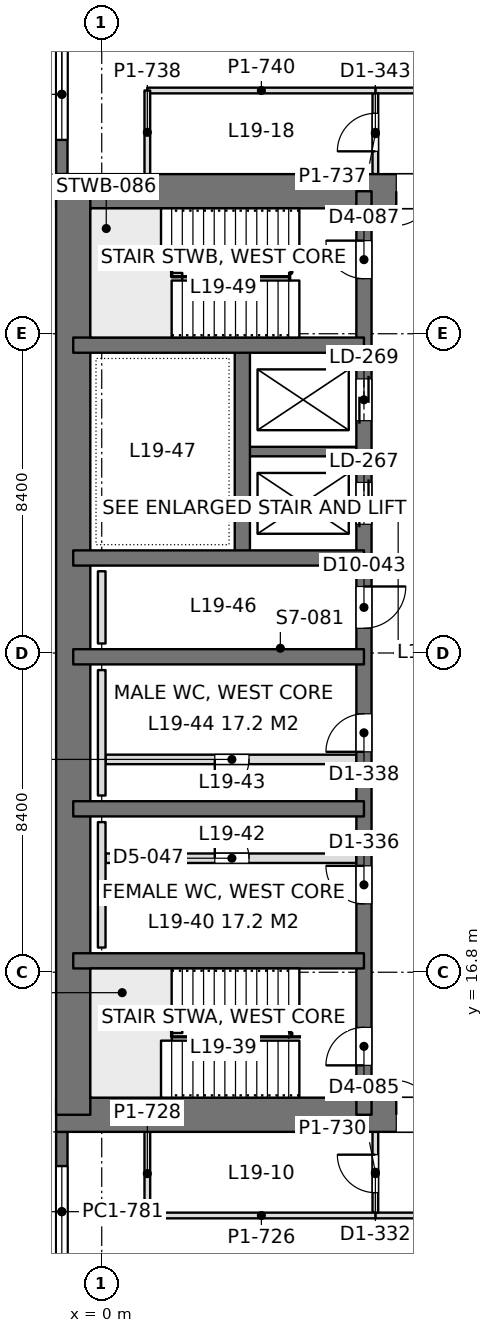
"""IFC4 building model, lengths in metres.
Left out: names, types, materials, properties, quantities, classifications, styles, units other than length and angle.
Written with IfcOpenShell. Run it as: python <this file> out.ifc"""

import sys

from ifc_helpers import new_model, si_unit, direction, frame, frame_2d, origin, place, context, subcontext, project, spatial, rectangle, extrude, element, fill, save


model = new_model("IFC4")
c1 = context("Model", 3, precision=1e-05, world=origin(), true_north=direction((0.0, 1.0)))
c2 = subcontext(c1, "Body", "Model", "MODEL_VIEW")
j1 = project(units=[si_unit("LENGTHUNIT", "METRE"), si_unit("PLANEANGLEUNIT", "RADIAN")], contexts=[c1])
p1 = place(None, origin())
s1 = spatial("IfcSite", under=j1, at=p1, CompositionType="ELEMENT")
p2 = place(p1, origin())
s2 = spatial("IfcBuilding", under=s1, at=p2, CompositionType="ELEMENT")
p3 = place(p2, frame((0.0, 0.0, 86.4)))
s3 = spatial("IfcBuildingStorey", under=s2, at=p3, CompositionType="ELEMENT", Elevation=86.4)
p4 = place(p3, frame((-1.2, 13.05, 0.0), z_axis=(0.0, 0.0, 1.0), x_axis=(1.0, 0.0, 0.0)))
e1 = element("IfcWall", 1, at=p4, inside=s3, PredefinedType="SHEAR", context=c2, shape_type="SweptSolid", body=[
    extrude(rectangle(XDim=18.0, YDim=0.9, at=frame_2d((9.0, 0.0))), origin(), (0.0, 0.0, 1.0), 4.5),
])
p5 = place(p4, frame((8.95, 0.0, 0.0)))
e2 = element("IfcOpeningElement", 2, at=p5, cuts=e1, PredefinedType="OPENING", context=c2, shape_type="SweptSolid", body=[
    extrude(rectangle(XDim=1.8, YDim=2.4, at=frame_2d((0.9, 1.2))), frame((0.0, 0.46, 0.0), z_axis=(0.0, -1.0, 0.0), x_axis=(1.0, 0.0, 0.0)), (0.0, 0.0, 1.0), 0.92),
])
p6 = place(p3, frame((-1.2, 37.35, 0.0), z_axis=(0.0, 0.0, 1.0), x_axis=(1.0, 0.0, 0.0)))
e3 = element("IfcWall", 3, at=p6, inside=s3, PredefinedType="SHEAR", context=c2, shape_type="SweptSolid", body=[
    extrude(rectangle(XDim=18.0, YDim=0.9, at=frame_2d((9.0, 0.0))), origin(), (0.0, 0.0, 1.0), 4.5),
])
p7 = place(p6, frame((8.95, 0.0, 0.0)))
e4 = element("IfcOpeningElement", 4, at=p7, cuts=e3, PredefinedType="OPENING", context=c2, shape_type="SweptSolid", body=[
    extrude(rectangle(XDim=1.8, YDim=2.4, at=frame_2d((0.9, 1.2))), frame((0.0, 0.46, 0.0), z_axis=(0.0, -1.0, 0.0), x_axis=(1.0, 0.0, 0.0)), (0.0, 0.0, 1.0), 0.92),
])
p8 = place(p3, frame((-0.75, 13.05, 0.0), z_axis=(0.0, 0.0, 1.0), x_axis=(0.0, 1.0, 0.0)))
e5 = element("IfcWall", 5, at=p8, inside=s3, PredefinedType="SHEAR", context=c2, shape_type="SweptSolid", body=[
    extrude(rectangle(XDim=24.3, YDim=0.9, at=frame_2d((12.15, 0.0))), origin(), (0.0, 0.0, 1.0), 4.5),
])
p9 = place(p3, frame((6.9, 13.05, 0.0), z_axis=(0.0, 0.0, 1.0), x_axis=(0.0, 1.0, 0.0)))
e6 = element("IfcWall", 6, at=p9, inside=s3, PredefinedType="SHEAR", context=c2, shape_type="SweptSolid", body=[
    extrude(rectangle(XDim=24.3, YDim=0.4, at=frame_2d((12.15, 0.0))), origin(), (0.0, 0.0, 1.0), 4.5),
])
p10 = place(p9, frame((1.3, 0.0, 0.0)))
e7 = element("IfcOpeningElement", 7, at=p10, cuts=e6, PredefinedType="OPENING", context=c2, shape_type="SweptSolid", body=[
    extrude(rectangle(XDim=1.0, YDim=2.2, at=frame_2d((0.5, 1.1))), frame((0.0, 0.21, 0.0), z_axis=(0.0, -1.0, 0.0), x_axis=(1.0, 0.0, 0.0)), (0.0, 0.0, 1.0), 0.42),
])
p11 = place(p9, frame((22.0, 0.0, 0.0)))
e8 = element("IfcOpeningElement", 8, at=p11, cuts=e6, PredefinedType="OPENING", context=c2, shape_type="SweptSolid", body=[
    extrude(rectangle(XDim=1.0, YDim=2.2, at=frame_2d((0.5, 1.1))), frame((0.0, 0.21, 0.0), z_axis=(0.0, -1.0, 0.0), x_axis=(1.0, 0.0, 0.0)), (0.0, 0.0, 1.0), 0.42),
])
p12 = place(p9, frame((5.55, 0.0, 0.0)))
e9 = element("IfcOpeningElement", 9, at=p12, cuts=e6, PredefinedType="OPENING", context=c2, shape_type="SweptSolid", body=[
    extrude(rectangle(XDim=1.0, YDim=2.2, at=frame_2d((0.5, 1.1))), frame((0.0, 0.21, 0.0), z_axis=(0.0, -1.0, 0.0), x_axis=(1.0, 0.0, 0.0)), (0.0, 0.0, 1.0), 0.42),
])
p13 = place(p9, frame((9.55, 0.0, 0.0)))
e10 = element("IfcOpeningElement", 10, at=p13, cuts=e6, PredefinedType="OPENING", context=c2, shape_type="SweptSolid", body=[
    extrude(rectangle(XDim=1.0, YDim=2.2, at=frame_2d((0.5, 1.1))), frame((0.0, 0.21, 0.0), z_axis=(0.0, -1.0, 0.0), x_axis=(1.0, 0.0, 0.0)), (0.0, 0.0, 1.0), 0.42),
])
p14 = place(p9, frame((12.8, 0.0, 0.0)))
e11 = element("IfcOpeningElement", 11, at=p14, cuts=e6, PredefinedType="OPENING", context=c2, shape_type="SweptSolid", body=[
    extrude(rectangle(XDim=1.1, YDim=2.2, at=frame_2d((0.55, 1.1))), frame((0.0, 0.21, 0.0), z_axis=(0.0, -1.0, 0.0), x_axis=(1.0, 0.0, 0.0)), (0.0, 0.0, 1.0), 0.42),
])
p15 = place(p9, frame((15.538, 0.0, 0.0)))
e12 = element("IfcOpeningElement", 12, at=p15, cuts=e6, PredefinedType="OPENING", context=c2, shape_type="SweptSolid", body=[
    extrude(rectangle(XDim=1.1, YDim=2.2, at=frame_2d((0.55, 1.1))), frame((0.0, 0.21, 0.0), z_axis=(0.0, -1.0, 0.0), x_axis=(1.0, 0.0, 0.0)), (0.0, 0.0, 1.0), 0.42),
])
p16 = place(p9, frame((18.262, 0.0, 0.0)))
e13 = element("IfcOpeningElement", 13, at=p16, cuts=e6, PredefinedType="OPENING", context=c2, shape_type="SweptSolid", body=[
    extrude(rectangle(XDim=1.1, YDim=2.2, at=frame_2d((0.55, 1.1))), frame((0.0, 0.21, 0.0), z_axis=(0.0, -1.0, 0.0), x_axis=(1.0, 0.0, 0.0)), (0.0, 0.0, 1.0), 0.42),
])
for number, where, z_axis, x_axis in (
    (14, (-0.75, 17.1, 0.0), (0.0, 0.0, 1.0), (1.0, 0.0, 0.0)),
    (15, (-0.75, 21.1, 0.0), (0.0, 0.0, 1.0), (1.0, 0.0, 0.0)),
    (16, (-0.75, 25.1, 0.0), (0.0, 0.0, 1.0), (1.0, 0.0, 0.0)),
    (17, (-0.75, 27.7, 0.0), (0.0, 0.0, 1.0), (1.0, 0.0, 0.0)),
    (18, (-0.75, 33.3, 0.0), (0.0, 0.0, 1.0), (1.0, 0.0, 0.0)),
):
    element("IfcWall", number, at=place(p3, frame(where, z_axis=z_axis, x_axis=x_axis)), inside=s3, PredefinedType="SHEAR", context=c2, shape_type="SweptSolid", body=[
        extrude(rectangle(XDim=7.65, YDim=0.4, at=frame_2d((3.825, 0.0))), origin(), (0.0, 0.0, 1.0), 4.5),
    ])
p17 = place(p3, frame((3.7, 27.7, 0.0), z_axis=(0.0, 0.0, 1.0), x_axis=(0.0, 1.0, 0.0)))
e19 = element("IfcWall", 19, at=p17, inside=s3, PredefinedType="SHEAR", context=c2, shape_type="SweptSolid", body=[
    extrude(rectangle(XDim=5.6, YDim=0.4, at=frame_2d((2.8, 0.0))), origin(), (0.0, 0.0, 1.0), 4.5),
])
p18 = place(p3, frame((3.7, 30.5, 0.0), z_axis=(0.0, 0.0, 1.0), x_axis=(1.0, 0.0, 0.0)))
e20 = element("IfcWall", 20, at=p18, inside=s3, PredefinedType="SHEAR", context=c2, shape_type="SweptSolid", body=[
    extrude(rectangle(XDim=3.2, YDim=0.25, at=frame_2d((1.6, 0.0))), origin(), (0.0, 0.0, 1.0), 4.5),
])
p19 = place(p3, frame((-1.05, 8.4, 0.0), z_axis=(0.0, 0.0, 1.0), x_axis=(0.0, 1.0, 0.0)))
e21 = element("IfcWall", 21, at=p19, inside=s3, PredefinedType="SOLIDWALL", context=c2, shape_type="SweptSolid", body=[
    extrude(rectangle(XDim=4.2, YDim=0.3, at=frame_2d((2.1, 0.0))), origin(), (0.0, 0.0, 1.0), 4.3),
])
p20 = place(p19, frame((0.9, 0.0, 0.9)))
e22 = element("IfcOpeningElement", 22, at=p20, cuts=e21, PredefinedType="OPENING", context=c2, shape_type="SweptSolid", body=[
    extrude(rectangle(XDim=2.4, YDim=1.9, at=frame_2d((1.2, 0.95))), frame((0.0, 0.16, 0.0), z_axis=(0.0, -1.0, 0.0), x_axis=(1.0, 0.0, 0.0)), (0.0, 0.0, 1.0), 0.32),
])
p21 = place(p3, frame((-1.05, 37.8, 0.0), z_axis=(0.0, 0.0, 1.0), x_axis=(0.0, 1.0, 0.0)))
e23 = element("IfcWall", 23, at=p21, inside=s3, PredefinedType="SOLIDWALL", context=c2, shape_type="SweptSolid", body=[
    extrude(rectangle(XDim=4.2, YDim=0.3, at=frame_2d((2.1, 0.0))), origin(), (0.0, 0.0, 1.0), 4.3),
])
p22 = place(p21, frame((0.9, 0.0, 0.9)))
e24 = element("IfcOpeningElement", 24, at=p22, cuts=e23, PredefinedType="OPENING", context=c2, shape_type="SweptSolid", body=[
    extrude(rectangle(XDim=2.4, YDim=1.9, at=frame_2d((1.2, 0.95))), frame((0.0, 0.16, 0.0), z_axis=(0.0, -1.0, 0.0), x_axis=(1.0, 0.0, 0.0)), (0.0, 0.0, 1.0), 0.32),
])
p23 = place(p3, frame((7.198, 10.4, 0.0), z_axis=(0.0, 0.0, 1.0), x_axis=(1.0, 0.0, 0.0)))
e25 = element("IfcWall", 25, at=p23, inside=s3, PredefinedType="PARTITIONING", context=c2, shape_type="SweptSolid", body=[
    extrude(rectangle(XDim=42.002, YDim=0.15, at=frame_2d((21.001, 0.0))), origin(), (0.0, 0.0, 1.0), 3.6),
])
p24 = place(p23, frame((4.502, 0.0, 0.0)))
e26 = element("IfcOpeningElement", 26, at=p24, cuts=e25, PredefinedType="OPENING", context=c2, shape_type="SweptSolid", body=[
    extrude(rectangle(XDim=1.8, YDim=2.2, at=frame_2d((0.9, 1.1))), frame((0.0, 0.085, 0.0), z_axis=(0.0, -1.0, 0.0), x_axis=(1.0, 0.0, 0.0)), (0.0, 0.0, 1.0), 0.17),
])
p25 = place(p23, frame((12.902, 0.0, 0.0)))
e27 = element("IfcOpeningElement", 27, at=p25, cuts=e25, PredefinedType="OPENING", context=c2, shape_type="SweptSolid", body=[
    extrude(rectangle(XDim=1.8, YDim=2.2, at=frame_2d((0.9, 1.1))), frame((0.0, 0.085, 0.0), z_axis=(0.0, -1.0, 0.0), x_axis=(1.0, 0.0, 0.0)), (0.0, 0.0, 1.0), 0.17),
])
p26 = place(p23, frame((21.302, 0.0, 0.0)))
e28 = element("IfcOpeningElement", 28, at=p26, cuts=e25, PredefinedType="OPENING", context=c2, shape_type="SweptSolid", body=[
    extrude(rectangle(XDim=1.8, YDim=2.2, at=frame_2d((0.9, 1.1))), frame((0.0, 0.085, 0.0), z_axis=(0.0, -1.0, 0.0), x_axis=(1.0, 0.0, 0.0)), (0.0, 0.0, 1.0), 0.17),
])
p27 = place(p23, frame((29.702, 0.0, 0.0)))
e29 = element("IfcOpeningElement", 29, at=p27, cuts=e25, PredefinedType="OPENING", context=c2, shape_type="SweptSolid", body=[
    extrude(rectangle(XDim=1.8, YDim=2.2, at=frame_2d((0.9, 1.1))), frame((0.0, 0.085, 0.0), z_axis=(0.0, -1.0, 0.0), x_axis=(1.0, 0.0, 0.0)), (0.0, 0.0, 1.0), 0.17),
])
p28 = place(p23, frame((38.102, 0.0, 0.0)))
e30 = element("IfcOpeningElement", 30, at=p28, cuts=e25, PredefinedType="OPENING", context=c2, shape_type="SweptSolid", body=[
    extrude(rectangle(XDim=1.8, YDim=2.2, at=frame_2d((0.9, 1.1))), frame((0.0, 0.085, 0.0), z_axis=(0.0, -1.0, 0.0), x_axis=(1.0, 0.0, 0.0)), (0.0, 0.0, 1.0), 0.17),
])
p29 = place(p3, frame((7.2, 10.474, 0.0), z_axis=(0.0, 0.0, 1.0), x_axis=(0.0, 1.0, 0.0)))
e31 = element("IfcWall", 31, at=p29, inside=s3, PredefinedType="PARTITIONING", context=c2, shape_type="SweptSolid", body=[
    extrude(rectangle(XDim=2.128, YDim=0.15, at=frame_2d((1.064, 0.0))), origin(), (0.0, 0.0, 1.0), 4.3),
])
p30 = place(p29, frame((0.526, 0.0, 0.0)))
e32 = element("IfcOpeningElement", 32, at=p30, cuts=e31, PredefinedType="OPENING", context=c2, shape_type="SweptSolid", body=[
    extrude(rectangle(XDim=1.0, YDim=2.2, at=frame_2d((0.5, 1.1))), frame((0.0, 0.085, 0.0), z_axis=(0.0, -1.0, 0.0), x_axis=(1.0, 0.0, 0.0)), (0.0, 0.0, 1.0), 0.17),
])
p31 = place(p3, frame((1.2, 10.4, 0.0), z_axis=(0.0, 0.0, 1.0), x_axis=(1.0, 0.0, 0.0)))
e33 = element("IfcWall", 33, at=p31, inside=s3, PredefinedType="PARTITIONING", context=c2, shape_type="SweptSolid", body=[
    extrude(rectangle(XDim=6.002, YDim=0.15, at=frame_2d((3.001, 0.0))), origin(), (0.0, 0.0, 1.0), 4.3),
])
p32 = place(p3, frame((1.2, 10.4, 0.0), z_axis=(0.0, 0.0, 1.0), x_axis=(0.0, 1.0, 0.0)))
e34 = element("IfcWall", 34, at=p32, inside=s3, PredefinedType="PARTITIONING", context=c2, shape_type="SweptSolid", body=[
    extrude(rectangle(XDim=2.202, YDim=0.15, at=frame_2d((1.101, 0.0))), origin(), (0.0, 0.0, 1.0), 4.3),
])
p33 = place(p3, frame((7.198, 40.0, 0.0), z_axis=(0.0, 0.0, 1.0), x_axis=(1.0, 0.0, 0.0)))
e35 = element("IfcWall", 35, at=p33, inside=s3, PredefinedType="PARTITIONING", context=c2, shape_type="SweptSolid", body=[
    extrude(rectangle(XDim=42.002, YDim=0.15, at=frame_2d((21.001, 0.0))), origin(), (0.0, 0.0, 1.0), 3.6),
])
p34 = place(p33, frame((4.502, 0.0, 0.0)))
e36 = element("IfcOpeningElement", 36, at=p34, cuts=e35, PredefinedType="OPENING", context=c2, shape_type="SweptSolid", body=[
    extrude(rectangle(XDim=1.8, YDim=2.2, at=frame_2d((0.9, 1.1))), frame((0.0, 0.085, 0.0), z_axis=(0.0, -1.0, 0.0), x_axis=(1.0, 0.0, 0.0)), (0.0, 0.0, 1.0), 0.17),
])
p35 = place(p33, frame((12.902, 0.0, 0.0)))
e37 = element("IfcOpeningElement", 37, at=p35, cuts=e35, PredefinedType="OPENING", context=c2, shape_type="SweptSolid", body=[
    extrude(rectangle(XDim=1.8, YDim=2.2, at=frame_2d((0.9, 1.1))), frame((0.0, 0.085, 0.0), z_axis=(0.0, -1.0, 0.0), x_axis=(1.0, 0.0, 0.0)), (0.0, 0.0, 1.0), 0.17),
])
p36 = place(p33, frame((21.302, 0.0, 0.0)))
e38 = element("IfcOpeningElement", 38, at=p36, cuts=e35, PredefinedType="OPENING", context=c2, shape_type="SweptSolid", body=[
    extrude(rectangle(XDim=1.8, YDim=2.2, at=frame_2d((0.9, 1.1))), frame((0.0, 0.085, 0.0), z_axis=(0.0, -1.0, 0.0), x_axis=(1.0, 0.0, 0.0)), (0.0, 0.0, 1.0), 0.17),
])
p37 = place(p33, frame((29.702, 0.0, 0.0)))
e39 = element("IfcOpeningElement", 39, at=p37, cuts=e35, PredefinedType="OPENING", context=c2, shape_type="SweptSolid", body=[
    extrude(rectangle(XDim=1.8, YDim=2.2, at=frame_2d((0.9, 1.1))), frame((0.0, 0.085, 0.0), z_axis=(0.0, -1.0, 0.0), x_axis=(1.0, 0.0, 0.0)), (0.0, 0.0, 1.0), 0.17),
])
p38 = place(p33, frame((38.102, 0.0, 0.0)))
e40 = element("IfcOpeningElement", 40, at=p38, cuts=e35, PredefinedType="OPENING", context=c2, shape_type="SweptSolid", body=[
    extrude(rectangle(XDim=1.8, YDim=2.2, at=frame_2d((0.9, 1.1))), frame((0.0, 0.085, 0.0), z_axis=(0.0, -1.0, 0.0), x_axis=(1.0, 0.0, 0.0)), (0.0, 0.0, 1.0), 0.17),
])
p39 = place(p3, frame((7.2, 37.8, 0.0), z_axis=(0.0, 0.0, 1.0), x_axis=(0.0, 1.0, 0.0)))
e41 = element("IfcWall", 41, at=p39, inside=s3, PredefinedType="PARTITIONING", context=c2, shape_type="SweptSolid", body=[
    extrude(rectangle(XDim=2.126, YDim=0.15, at=frame_2d((1.063, 0.0))), origin(), (0.0, 0.0, 1.0), 4.3),
])
p40 = place(p39, frame((0.6, 0.0, 0.0)))
e42 = element("IfcOpeningElement", 42, at=p40, cuts=e41, PredefinedType="OPENING", context=c2, shape_type="SweptSolid", body=[
    extrude(rectangle(XDim=1.0, YDim=2.2, at=frame_2d((0.5, 1.1))), frame((0.0, 0.085, 0.0), z_axis=(0.0, -1.0, 0.0), x_axis=(1.0, 0.0, 0.0)), (0.0, 0.0, 1.0), 0.17),
])
p41 = place(p3, frame((1.2, 40.0, 0.0), z_axis=(0.0, 0.0, 1.0), x_axis=(1.0, 0.0, 0.0)))
e43 = element("IfcWall", 43, at=p41, inside=s3, PredefinedType="PARTITIONING", context=c2, shape_type="SweptSolid", body=[
    extrude(rectangle(XDim=6.002, YDim=0.15, at=frame_2d((3.001, 0.0))), origin(), (0.0, 0.0, 1.0), 3.7),
])
p42 = place(p3, frame((1.2, 37.8, 0.0), z_axis=(0.0, 0.0, 1.0), x_axis=(0.0, 1.0, 0.0)))
e44 = element("IfcWall", 44, at=p42, inside=s3, PredefinedType="PARTITIONING", context=c2, shape_type="SweptSolid", body=[
    extrude(rectangle(XDim=2.2, YDim=0.15, at=frame_2d((1.1, 0.0))), origin(), (0.0, 0.0, 1.0), 4.3),
])
p43 = place(p3, frame((0.1, 22.4, 0.0), z_axis=(0.0, 0.0, 1.0), x_axis=(1.0, 0.0, 0.0)))
e45 = element("IfcWall", 45, at=p43, inside=s3, PredefinedType="PARTITIONING", context=c2, shape_type="SweptSolid", body=[
    extrude(rectangle(XDim=6.6, YDim=0.25, at=frame_2d((3.3, 0.0))), origin(), (0.0, 0.0, 1.0), 4.3),
])
p44 = place(p43, frame((2.875, 0.0, 0.0)))
e46 = element("IfcOpeningElement", 46, at=p44, cuts=e45, PredefinedType="OPENING", context=c2, shape_type="SweptSolid", body=[
    extrude(rectangle(XDim=0.9, YDim=2.2, at=frame_2d((0.45, 1.1))), frame((0.0, 0.135, 0.0), z_axis=(0.0, -1.0, 0.0), x_axis=(1.0, 0.0, 0.0)), (0.0, 0.0, 1.0), 0.27),
])
p45 = place(p3, frame((0.1, 19.8, 0.0), z_axis=(0.0, 0.0, 1.0), x_axis=(1.0, 0.0, 0.0)))
e47 = element("IfcWall", 47, at=p45, inside=s3, PredefinedType="PARTITIONING", context=c2, shape_type="SweptSolid", body=[
    extrude(rectangle(XDim=6.6, YDim=0.25, at=frame_2d((3.3, 0.0))), origin(), (0.0, 0.0, 1.0), 4.3),
])
p46 = place(p45, frame((2.875, 0.0, 0.0)))
e48 = element("IfcOpeningElement", 48, at=p46, cuts=e47, PredefinedType="OPENING", context=c2, shape_type="SweptSolid", body=[
    extrude(rectangle(XDim=0.9, YDim=2.2, at=frame_2d((0.45, 1.1))), frame((0.0, 0.135, 0.0), z_axis=(0.0, -1.0, 0.0), x_axis=(1.0, 0.0, 0.0)), (0.0, 0.0, 1.0), 0.27),
])
for number, where, z_axis, x_axis in (
    (49, (0.0, 17.45, 0.0), (0.0, 0.0, 1.0), (0.0, 1.0, 0.0)),
    (50, (0.0, 21.45, 0.0), (0.0, 0.0, 1.0), (0.0, 1.0, 0.0)),
):
    element("IfcWall", number, at=place(p3, frame(where, z_axis=z_axis, x_axis=x_axis)), inside=s3, PredefinedType="PLUMBINGWALL", context=c2, shape_type="SweptSolid", body=[
        extrude(rectangle(XDim=3.3, YDim=0.2, at=frame_2d((1.65, 0.0))), origin(), (0.0, 0.0, 1.0), 1.2),
    ])
p47 = place(p3, frame((0.0, 25.45, 0.0), z_axis=(0.0, 0.0, 1.0), x_axis=(0.0, 1.0, 0.0)))
e51 = element("IfcWall", 51, at=p47, inside=s3, PredefinedType="PLUMBINGWALL", context=c2, shape_type="SweptSolid", body=[
    extrude(rectangle(XDim=1.9, YDim=0.2, at=frame_2d((0.95, 0.0))), origin(), (0.0, 0.0, 1.0), 1.2),
])
p48 = place(p20, origin())
e52 = element("IfcWindow", 52, at=p48, inside=s3, PartitioningType="SINGLE_PANEL", PredefinedType="WINDOW", context=c2, shape_type="SweptSolid", body=[
    extrude(rectangle(XDim=2.4, YDim=1.9, at=frame_2d((1.2, 0.95))), frame((0.0, 0.03, 0.0), z_axis=(0.0, -1.0, 0.0), x_axis=(1.0, 0.0, 0.0)), (0.0, 0.0, 1.0), 0.06),
])
fill(e22, e52)
p49 = place(p22, origin())
e53 = element("IfcWindow", 53, at=p49, inside=s3, PartitioningType="SINGLE_PANEL", PredefinedType="WINDOW", context=c2, shape_type="SweptSolid", body=[
    extrude(rectangle(XDim=2.4, YDim=1.9, at=frame_2d((1.2, 0.95))), frame((0.0, 0.03, 0.0), z_axis=(0.0, -1.0, 0.0), x_axis=(1.0, 0.0, 0.0)), (0.0, 0.0, 1.0), 0.06),
])
fill(e24, e53)
p50 = place(p5, origin())
e54 = element("IfcDoor", 54, at=p50, inside=s3, OperationType="DOUBLE_DOOR_SINGLE_SWING", PredefinedType="DOOR", context=c2, shape_type="SweptSolid", body=[
    extrude(rectangle(XDim=1.8, YDim=2.4, at=frame_2d((0.9, 1.2))), frame((0.0, 0.025, 0.0), z_axis=(0.0, -1.0, 0.0), x_axis=(1.0, 0.0, 0.0)), (0.0, 0.0, 1.0), 0.05),
])
fill(e2, e54)
p51 = place(p7, frame((1.8, 0.0, 0.0), z_axis=(0.0, 0.0, 1.0), x_axis=(-1.0, 0.0, 0.0)))
e55 = element("IfcDoor", 55, at=p51, inside=s3, OperationType="DOUBLE_DOOR_SINGLE_SWING", PredefinedType="DOOR", context=c2, shape_type="SweptSolid", body=[
    extrude(rectangle(XDim=1.8, YDim=2.4, at=frame_2d((0.9, 1.2))), frame((0.0, 0.025, 0.0), z_axis=(0.0, -1.0, 0.0), x_axis=(1.0, 0.0, 0.0)), (0.0, 0.0, 1.0), 0.05),
])
fill(e4, e55)
p52 = place(p10, origin())
e56 = element("IfcDoor", 56, at=p52, inside=s3, OperationType="SINGLE_SWING_LEFT", PredefinedType="DOOR", context=c2, shape_type="SweptSolid", body=[
    extrude(rectangle(XDim=1.0, YDim=2.2, at=frame_2d((0.5, 1.1))), frame((0.0, 0.025, 0.0), z_axis=(0.0, -1.0, 0.0), x_axis=(1.0, 0.0, 0.0)), (0.0, 0.0, 1.0), 0.05),
])
fill(e7, e56)
p53 = place(p11, origin())
e57 = element("IfcDoor", 57, at=p53, inside=s3, OperationType="SINGLE_SWING_RIGHT", PredefinedType="DOOR", context=c2, shape_type="SweptSolid", body=[
    extrude(rectangle(XDim=1.0, YDim=2.2, at=frame_2d((0.5, 1.1))), frame((0.0, 0.025, 0.0), z_axis=(0.0, -1.0, 0.0), x_axis=(1.0, 0.0, 0.0)), (0.0, 0.0, 1.0), 0.05),
])
fill(e8, e57)
p54 = place(p12, origin())
e58 = element("IfcDoor", 58, at=p54, inside=s3, OperationType="SINGLE_SWING_RIGHT", PredefinedType="DOOR", context=c2, shape_type="SweptSolid", body=[
    extrude(rectangle(XDim=1.0, YDim=2.2, at=frame_2d((0.5, 1.1))), frame((0.0, 0.025, 0.0), z_axis=(0.0, -1.0, 0.0), x_axis=(1.0, 0.0, 0.0)), (0.0, 0.0, 1.0), 0.05),
])
fill(e9, e58)
p55 = place(p13, origin())
e59 = element("IfcDoor", 59, at=p55, inside=s3, OperationType="SINGLE_SWING_LEFT", PredefinedType="DOOR", context=c2, shape_type="SweptSolid", body=[
    extrude(rectangle(XDim=1.0, YDim=2.2, at=frame_2d((0.5, 1.1))), frame((0.0, 0.025, 0.0), z_axis=(0.0, -1.0, 0.0), x_axis=(1.0, 0.0, 0.0)), (0.0, 0.0, 1.0), 0.05),
])
fill(e10, e59)
p56 = place(p14, frame((1.1, 0.0, 0.0), z_axis=(0.0, 0.0, 1.0), x_axis=(-1.0, 0.0, 0.0)))
e60 = element("IfcDoor", 60, at=p56, inside=s3, OperationType="SINGLE_SWING_LEFT", PredefinedType="DOOR", context=c2, shape_type="SweptSolid", body=[
    extrude(rectangle(XDim=1.1, YDim=2.2, at=frame_2d((0.55, 1.1))), frame((0.0, 0.025, 0.0), z_axis=(0.0, -1.0, 0.0), x_axis=(1.0, 0.0, 0.0)), (0.0, 0.0, 1.0), 0.05),
])
fill(e11, e60)
p57 = place(p15, origin())
e61 = element("IfcDoor", 61, at=p57, inside=s3, OperationType="DOUBLE_DOOR_SLIDING", PredefinedType="DOOR", context=c2, shape_type="SweptSolid", body=[
    extrude(rectangle(XDim=1.1, YDim=2.2, at=frame_2d((0.55, 1.1))), frame((0.0, 0.025, 0.0), z_axis=(0.0, -1.0, 0.0), x_axis=(1.0, 0.0, 0.0)), (0.0, 0.0, 1.0), 0.05),
])
fill(e12, e61)
p58 = place(p16, origin())
e62 = element("IfcDoor", 62, at=p58, inside=s3, OperationType="DOUBLE_DOOR_SLIDING", PredefinedType="DOOR", context=c2, shape_type="SweptSolid", body=[
    extrude(rectangle(XDim=1.1, YDim=2.2, at=frame_2d((0.55, 1.1))), frame((0.0, 0.025, 0.0), z_axis=(0.0, -1.0, 0.0), x_axis=(1.0, 0.0, 0.0)), (0.0, 0.0, 1.0), 0.05),
])
fill(e13, e62)
p59 = place(p30, origin())
e63 = element("IfcDoor", 63, at=p59, inside=s3, OperationType="SINGLE_SWING_RIGHT", PredefinedType="DOOR", context=c2, shape_type="SweptSolid", body=[
    extrude(rectangle(XDim=1.0, YDim=2.2, at=frame_2d((0.5, 1.1))), frame((0.0, 0.025, 0.0), z_axis=(0.0, -1.0, 0.0), x_axis=(1.0, 0.0, 0.0)), (0.0, 0.0, 1.0), 0.05),
])
fill(e32, e63)
p60 = place(p40, origin())
e64 = element("IfcDoor", 64, at=p60, inside=s3, OperationType="SINGLE_SWING_LEFT", PredefinedType="DOOR", context=c2, shape_type="SweptSolid", body=[
    extrude(rectangle(XDim=1.0, YDim=2.2, at=frame_2d((0.5, 1.1))), frame((0.0, 0.025, 0.0), z_axis=(0.0, -1.0, 0.0), x_axis=(1.0, 0.0, 0.0)), (0.0, 0.0, 1.0), 0.05),
])
fill(e42, e64)
p61 = place(p44, frame((0.9, 0.0, 0.0), z_axis=(0.0, 0.0, 1.0), x_axis=(-1.0, 0.0, 0.0)))
e65 = element("IfcDoor", 65, at=p61, inside=s3, OperationType="SINGLE_SWING_RIGHT", PredefinedType="DOOR", context=c2, shape_type="SweptSolid", body=[
    extrude(rectangle(XDim=0.9, YDim=2.2, at=frame_2d((0.45, 1.1))), frame((0.0, 0.025, 0.0), z_axis=(0.0, -1.0, 0.0), x_axis=(1.0, 0.0, 0.0)), (0.0, 0.0, 1.0), 0.05),
])
fill(e46, e65)
p62 = place(p46, origin())
e66 = element("IfcDoor", 66, at=p62, inside=s3, OperationType="SINGLE_SWING_LEFT", PredefinedType="DOOR", context=c2, shape_type="SweptSolid", body=[
    extrude(rectangle(XDim=0.9, YDim=2.2, at=frame_2d((0.45, 1.1))), frame((0.0, 0.025, 0.0), z_axis=(0.0, -1.0, 0.0), x_axis=(1.0, 0.0, 0.0)), (0.0, 0.0, 1.0), 0.05),
])
fill(e48, e66)
save(model, sys.argv[1])
